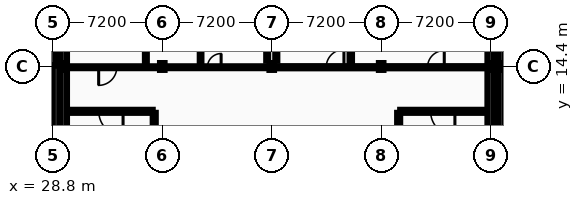
"""IFC4 building model, lengths in metres.
Left out: names, types, materials, properties, quantities, classifications, styles, units other than length and angle.
Written with IfcOpenShell. Run it as: python <this file> out.ifc"""

import sys

from ifc_helpers import new_model, si_unit, direction, frame, frame_2d, origin, origin_2d, place, context, subcontext, project, spatial, rectangle, i_section, extrude, element, fill, save


model = new_model("IFC4")
c1 = context("Model", 3, precision=1e-05, world=origin(), true_north=direction((0.0, 1.0)))
c2 = subcontext(c1, "Body", "Model", "MODEL_VIEW")
j1 = project(units=[si_unit("LENGTHUNIT", "METRE"), si_unit("PLANEANGLEUNIT", "RADIAN")], contexts=[c1])
p1 = place(None, origin())
s1 = spatial("IfcSite", under=j1, at=p1, CompositionType="ELEMENT")
p2 = place(p1, origin())
s2 = spatial("IfcBuilding", under=s1, at=p2, CompositionType="ELEMENT")
p3 = place(p2, origin())
s3 = spatial("IfcBuildingStorey", under=s2, at=p3, CompositionType="ELEMENT", Elevation=0.0)
for number, where, z_axis, x_axis in (
    (1, (29.52, 14.4, 0.0), (0.0, 0.0, 1.0), (1.0, 0.0, 0.0)),
    (2, (36.0, 14.4, 0.0), (0.0, 0.0, 1.0), (1.0, 0.0, 0.0)),
    (3, (43.2, 14.4, 0.0), (0.0, 0.0, 1.0), (1.0, 0.0, 0.0)),
    (4, (50.4, 14.4, 0.0), (0.0, 0.0, 1.0), (1.0, 0.0, 0.0)),
    (5, (57.6, 14.4, 0.0), (0.0, 0.0, 1.0), (1.0, 0.0, 0.0)),
    (6, (58.32, 14.4, 0.0), (0.0, 0.0, 1.0), (1.0, 0.0, 0.0)),
):
    element("IfcColumn", number, at=place(p3, frame(where, z_axis=z_axis, x_axis=x_axis)), inside=s3, PredefinedType="COLUMN", context=c2, shape_type="SweptSolid", body=[
        extrude(i_section(OverallWidth=0.3, OverallDepth=0.45, WebThickness=0.014, FlangeThickness=0.026, FilletRadius=0.027, at=origin_2d()), origin(), (0.0, 0.0, 1.0), 5.2),
    ])
p4 = place(p3, frame((28.8, 14.45, 0.0), z_axis=(0.0, 0.0, 1.0), x_axis=(0.0, 1.0, 0.0)))
e7 = element("IfcWall", 7, at=p4, inside=s3, PredefinedType="STANDARD", context=c2, shape_type="SweptSolid", body=[
    extrude(rectangle(XDim=7.15, YDim=0.42, at=frame_2d((3.575, 0.0))), origin(), (0.0, 0.0, 1.0), 4.97),
])
p5 = place(p4, frame((1.647, 0.0, 0.95)))
e8 = element("IfcOpeningElement", 8, at=p5, cuts=e7, PredefinedType="OPENING", context=c2, shape_type="SweptSolid", body=[
    extrude(rectangle(XDim=0.996, YDim=1.26, at=frame_2d((0.498, 0.63))), frame((0.0, 0.22, 0.0), z_axis=(0.0, -1.0, 0.0), x_axis=(1.0, 0.0, 0.0)), (0.0, 0.0, 1.0), 0.44),
])
p6 = place(p4, frame((4.507, 0.0, 0.95)))
e9 = element("IfcOpeningElement", 9, at=p6, cuts=e7, PredefinedType="OPENING", context=c2, shape_type="SweptSolid", body=[
    extrude(rectangle(XDim=0.996, YDim=1.26, at=frame_2d((0.498, 0.63))), frame((0.0, 0.22, 0.0), z_axis=(0.0, -1.0, 0.0), x_axis=(1.0, 0.0, 0.0)), (0.0, 0.0, 1.0), 0.44),
])
p7 = place(p3, frame((29.52, 14.4, 0.0), z_axis=(0.0, 0.0, 1.0), x_axis=(0.0, -1.0, 0.0)))
e10 = element("IfcWall", 10, at=p7, inside=s3, PredefinedType="STANDARD", context=c2, shape_type="SweptSolid", body=[
    extrude(rectangle(XDim=5.5, YDim=0.42, at=frame_2d((2.75, 0.0))), origin(), (0.0, 0.0, 1.0), 4.97),
])
p8 = place(p3, frame((29.52, 21.6, 0.0), z_axis=(0.0, 0.0, 1.0), x_axis=(0.0, -1.0, 0.0)))
e11 = element("IfcWall", 11, at=p8, inside=s3, PredefinedType="STANDARD", context=c2, shape_type="SweptSolid", body=[
    extrude(rectangle(XDim=7.2, YDim=0.42, at=frame_2d((3.6, 0.0))), origin(), (0.0, 0.0, 1.0), 4.665),
])
p9 = place(p8, frame((1.628, 0.0, 0.95)))
e12 = element("IfcOpeningElement", 12, at=p9, cuts=e11, PredefinedType="OPENING", context=c2, shape_type="SweptSolid", body=[
    extrude(rectangle(XDim=1.064, YDim=1.296, at=frame_2d((0.532, 0.648))), frame((0.0, 0.22, 0.0), z_axis=(0.0, -1.0, 0.0), x_axis=(1.0, 0.0, 0.0)), (0.0, 0.0, 1.0), 0.44),
])
p10 = place(p8, frame((4.508, 0.0, 0.95)))
e13 = element("IfcOpeningElement", 13, at=p10, cuts=e11, PredefinedType="OPENING", context=c2, shape_type="SweptSolid", body=[
    extrude(rectangle(XDim=1.064, YDim=1.296, at=frame_2d((0.532, 0.648))), frame((0.0, 0.22, 0.0), z_axis=(0.0, -1.0, 0.0), x_axis=(1.0, 0.0, 0.0)), (0.0, 0.0, 1.0), 0.44),
])
p11 = place(p3, frame((57.6, 8.9, 0.0), z_axis=(0.0, 0.0, 1.0), x_axis=(0.0, 1.0, 0.0)))
e14 = element("IfcWall", 14, at=p11, inside=s3, PredefinedType="STANDARD", context=c2, shape_type="SweptSolid", body=[
    extrude(rectangle(XDim=5.5, YDim=0.42, at=frame_2d((2.75, 0.0))), origin(), (0.0, 0.0, 1.0), 4.97),
])
p12 = place(p3, frame((57.6, 14.4, 0.0), z_axis=(0.0, 0.0, 1.0), x_axis=(0.0, 1.0, 0.0)))
e15 = element("IfcWall", 15, at=p12, inside=s3, PredefinedType="STANDARD", context=c2, shape_type="SweptSolid", body=[
    extrude(rectangle(XDim=7.2, YDim=0.42, at=frame_2d((3.6, 0.0))), origin(), (0.0, 0.0, 1.0), 4.665),
])
p13 = place(p12, frame((1.56, 0.0, 0.95)))
e16 = element("IfcOpeningElement", 16, at=p13, cuts=e15, PredefinedType="OPENING", context=c2, shape_type="SweptSolid", body=[
    extrude(rectangle(XDim=1.2, YDim=1.296, at=frame_2d((0.6, 0.648))), frame((0.0, 0.22, 0.0), z_axis=(0.0, -1.0, 0.0), x_axis=(1.0, 0.0, 0.0)), (0.0, 0.0, 1.0), 0.44),
])
p14 = place(p12, frame((4.44, 0.0, 0.95)))
e17 = element("IfcOpeningElement", 17, at=p14, cuts=e15, PredefinedType="OPENING", context=c2, shape_type="SweptSolid", body=[
    extrude(rectangle(XDim=1.2, YDim=1.296, at=frame_2d((0.6, 0.648))), frame((0.0, 0.22, 0.0), z_axis=(0.0, -1.0, 0.0), x_axis=(1.0, 0.0, 0.0)), (0.0, 0.0, 1.0), 0.44),
])
p15 = place(p3, frame((58.32, 14.4, 0.0), z_axis=(0.0, 0.0, 1.0), x_axis=(0.0, -1.0, 0.0)))
e18 = element("IfcWall", 18, at=p15, inside=s3, PredefinedType="STANDARD", context=c2, shape_type="SweptSolid", body=[
    extrude(rectangle(XDim=5.5, YDim=0.42, at=frame_2d((2.75, 0.0))), origin(), (0.0, 0.0, 1.0), 4.97),
])
p16 = place(p3, frame((58.32, 21.6, 0.0), z_axis=(0.0, 0.0, 1.0), x_axis=(0.0, -1.0, 0.0)))
e19 = element("IfcWall", 19, at=p16, inside=s3, PredefinedType="STANDARD", context=c2, shape_type="SweptSolid", body=[
    extrude(rectangle(XDim=7.2, YDim=0.42, at=frame_2d((3.6, 0.0))), origin(), (0.0, 0.0, 1.0), 4.665),
])
p17 = place(p16, frame((1.713, 0.0, 0.95)))
e20 = element("IfcOpeningElement", 20, at=p17, cuts=e19, PredefinedType="OPENING", context=c2, shape_type="SweptSolid", body=[
    extrude(rectangle(XDim=0.894, YDim=1.26, at=frame_2d((0.447, 0.63))), frame((0.0, 0.22, 0.0), z_axis=(0.0, -1.0, 0.0), x_axis=(1.0, 0.0, 0.0)), (0.0, 0.0, 1.0), 0.44),
])
p18 = place(p16, frame((4.593, 0.0, 0.95)))
e21 = element("IfcOpeningElement", 21, at=p18, cuts=e19, PredefinedType="OPENING", context=c2, shape_type="SweptSolid", body=[
    extrude(rectangle(XDim=0.894, YDim=1.26, at=frame_2d((0.447, 0.63))), frame((0.0, 0.22, 0.0), z_axis=(0.0, -1.0, 0.0), x_axis=(1.0, 0.0, 0.0)), (0.0, 0.0, 1.0), 0.44),
])
p19 = place(p3, frame((28.6, 5.85, 0.0), z_axis=(0.0, 0.0, 1.0), x_axis=(0.0, 1.0, 0.0)))
e22 = element("IfcWall", 22, at=p19, inside=s3, PredefinedType="SHEAR", context=c2, shape_type="SweptSolid", body=[
    extrude(rectangle(XDim=8.6, YDim=0.4, at=frame_2d((4.3, 0.0))), origin(), (0.0, 0.0, 1.0), 4.97),
])
p20 = place(p19, frame((6.65, 0.0, 0.0)))
e23 = element("IfcOpeningElement", 23, at=p20, cuts=e22, PredefinedType="OPENING", context=c2, shape_type="SweptSolid", body=[
    extrude(rectangle(XDim=1.2, YDim=2.15, at=frame_2d((0.6, 1.075))), frame((0.0, 0.21, 0.0), z_axis=(0.0, -1.0, 0.0), x_axis=(1.0, 0.0, 0.0)), (0.0, 0.0, 1.0), 0.42),
])
p21 = place(p3, frame((29.87, 11.45, 0.0), z_axis=(0.0, 0.0, 1.0), x_axis=(1.0, 0.0, 0.0)))
e24 = element("IfcWall", 24, at=p21, inside=s3, PredefinedType="PARTITIONING", context=c2, shape_type="SweptSolid", body=[
    extrude(rectangle(XDim=5.5, YDim=0.2, at=frame_2d((2.75, 0.0))), origin(), (0.0, 0.0, 1.0), 4.97),
])
p22 = place(p21, frame((1.95, 0.0, 0.0)))
e25 = element("IfcOpeningElement", 25, at=p22, cuts=e24, PredefinedType="OPENING", context=c2, shape_type="SweptSolid", body=[
    extrude(rectangle(XDim=1.6, YDim=2.2, at=frame_2d((0.8, 1.1))), frame((0.0, 0.11, 0.0), z_axis=(0.0, -1.0, 0.0), x_axis=(1.0, 0.0, 0.0)), (0.0, 0.0, 1.0), 0.22),
])
p23 = place(p3, frame((35.47, 8.9, 0.0), z_axis=(0.0, 0.0, 1.0), x_axis=(0.0, 1.0, 0.0)))
e26 = element("IfcWall", 26, at=p23, inside=s3, PredefinedType="PARTITIONING", context=c2, shape_type="SweptSolid", body=[
    extrude(rectangle(XDim=2.45, YDim=0.2, at=frame_2d((1.225, 0.0))), origin(), (0.0, 0.0, 1.0), 4.97),
])
p24 = place(p3, frame((51.65, 11.45, 0.0), z_axis=(0.0, 0.0, 1.0), x_axis=(1.0, 0.0, 0.0)))
e27 = element("IfcWall", 27, at=p24, inside=s3, PredefinedType="PARTITIONING", context=c2, shape_type="SweptSolid", body=[
    extrude(rectangle(XDim=5.6, YDim=0.2, at=frame_2d((2.8, 0.0))), origin(), (0.0, 0.0, 1.0), 4.97),
])
p25 = place(p24, frame((2.0, 0.0, 0.0)))
e28 = element("IfcOpeningElement", 28, at=p25, cuts=e27, PredefinedType="OPENING", context=c2, shape_type="SweptSolid", body=[
    extrude(rectangle(XDim=1.6, YDim=2.2, at=frame_2d((0.8, 1.1))), frame((0.0, 0.11, 0.0), z_axis=(0.0, -1.0, 0.0), x_axis=(1.0, 0.0, 0.0)), (0.0, 0.0, 1.0), 0.22),
])
p26 = place(p3, frame((51.55, 8.9, 0.0), z_axis=(0.0, 0.0, 1.0), x_axis=(0.0, 1.0, 0.0)))
e29 = element("IfcWall", 29, at=p26, inside=s3, PredefinedType="PARTITIONING", context=c2, shape_type="SweptSolid", body=[
    extrude(rectangle(XDim=2.45, YDim=0.2, at=frame_2d((1.225, 0.0))), origin(), (0.0, 0.0, 1.0), 4.97),
])
p27 = place(p3, frame((29.9, 14.35, 0.0), z_axis=(0.0, 0.0, 1.0), x_axis=(1.0, 0.0, 0.0)))
e30 = element("IfcWall", 30, at=p27, inside=s3, PredefinedType="PARTITIONING", context=c2, shape_type="SweptSolid", body=[
    extrude(rectangle(XDim=5.72, YDim=0.125, at=frame_2d((2.86, 0.0))), origin(), (0.0, 0.0, 1.0), 4.665),
])
p28 = place(p27, frame((1.914, 0.0, 0.0)))
e31 = element("IfcOpeningElement", 31, at=p28, cuts=e30, PredefinedType="OPENING", context=c2, shape_type="SweptSolid", body=[
    extrude(rectangle(XDim=1.192, YDim=2.068, at=frame_2d((0.596, 1.034))), frame((0.0, 0.073, 0.0), z_axis=(0.0, -1.0, 0.0), x_axis=(1.0, 0.0, 0.0)), (0.0, 0.0, 1.0), 0.145),
])
p29 = place(p3, frame((36.38, 14.35, 0.0), z_axis=(0.0, 0.0, 1.0), x_axis=(1.0, 0.0, 0.0)))
e32 = element("IfcWall", 32, at=p29, inside=s3, PredefinedType="PARTITIONING", context=c2, shape_type="SweptSolid", body=[
    extrude(rectangle(XDim=6.44, YDim=0.125, at=frame_2d((3.22, 0.0))), origin(), (0.0, 0.0, 1.0), 4.665),
])
p30 = place(p29, frame((0.57, 0.0, 0.0)))
e33 = element("IfcOpeningElement", 33, at=p30, cuts=e32, PredefinedType="OPENING", context=c2, shape_type="SweptSolid", body=[
    extrude(rectangle(XDim=1.0, YDim=2.1, at=frame_2d((0.5, 1.05))), frame((0.0, 0.073, 0.0), z_axis=(0.0, -1.0, 0.0), x_axis=(1.0, 0.0, 0.0)), (0.0, 0.0, 1.0), 0.145),
])
p31 = place(p29, frame((2.59, 0.0, 0.0)))
e34 = element("IfcOpeningElement", 34, at=p31, cuts=e32, PredefinedType="OPENING", context=c2, shape_type="SweptSolid", body=[
    extrude(rectangle(XDim=0.9, YDim=2.1, at=frame_2d((0.45, 1.05))), frame((0.0, 0.073, 0.0), z_axis=(0.0, -1.0, 0.0), x_axis=(1.0, 0.0, 0.0)), (0.0, 0.0, 1.0), 0.145),
])
p32 = place(p3, frame((43.58, 14.35, 0.0), z_axis=(0.0, 0.0, 1.0), x_axis=(1.0, 0.0, 0.0)))
e35 = element("IfcWall", 35, at=p32, inside=s3, PredefinedType="PARTITIONING", context=c2, shape_type="SweptSolid", body=[
    extrude(rectangle(XDim=6.44, YDim=0.142, at=frame_2d((3.22, 0.0))), origin(), (0.0, 0.0, 1.0), 4.665),
])
p33 = place(p32, frame((3.204, 0.0, 0.0)))
e36 = element("IfcOpeningElement", 36, at=p33, cuts=e35, PredefinedType="OPENING", context=c2, shape_type="SweptSolid", body=[
    extrude(rectangle(XDim=1.166, YDim=2.068, at=frame_2d((0.583, 1.034))), frame((0.0, 0.081, 0.0), z_axis=(0.0, -1.0, 0.0), x_axis=(1.0, 0.0, 0.0)), (0.0, 0.0, 1.0), 0.162),
])
p34 = place(p3, frame((50.78, 14.35, 0.0), z_axis=(0.0, 0.0, 1.0), x_axis=(1.0, 0.0, 0.0)))
e37 = element("IfcWall", 37, at=p34, inside=s3, PredefinedType="PARTITIONING", context=c2, shape_type="SweptSolid", body=[
    extrude(rectangle(XDim=6.44, YDim=0.142, at=frame_2d((3.22, 0.0))), origin(), (0.0, 0.0, 1.0), 4.665),
])
p35 = place(p34, frame((2.67, 0.0, 0.0)))
e38 = element("IfcOpeningElement", 38, at=p35, cuts=e37, PredefinedType="OPENING", context=c2, shape_type="SweptSolid", body=[
    extrude(rectangle(XDim=1.1, YDim=2.15, at=frame_2d((0.55, 1.075))), frame((0.0, 0.081, 0.0), z_axis=(0.0, -1.0, 0.0), x_axis=(1.0, 0.0, 0.0)), (0.0, 0.0, 1.0), 0.162),
])
p36 = place(p3, frame((34.92, 14.413, 0.0), z_axis=(0.0, 0.0, 1.0), x_axis=(0.0, 1.0, 0.0)))
e39 = element("IfcWall", 39, at=p36, inside=s3, PredefinedType="PARTITIONING", context=c2, shape_type="SweptSolid", body=[
    extrude(rectangle(XDim=14.188, YDim=0.125, at=frame_2d((7.094, 0.0))), origin(), (0.0, 0.0, 1.0), 4.97),
])
p37 = place(p3, frame((38.52, 14.413, 0.0), z_axis=(0.0, 0.0, 1.0), x_axis=(0.0, 1.0, 0.0)))
e40 = element("IfcWall", 40, at=p37, inside=s3, PredefinedType="PARTITIONING", context=c2, shape_type="SweptSolid", body=[
    extrude(rectangle(XDim=14.132, YDim=0.11, at=frame_2d((7.066, 0.0))), origin(), (0.0, 0.0, 1.0), 4.655),
])
p38 = place(p3, frame((42.9, 14.78, 0.0), z_axis=(0.0, 0.0, 1.0), x_axis=(0.0, 1.0, 0.0)))
e41 = element("IfcWall", 41, at=p38, inside=s3, PredefinedType="PARTITIONING", context=c2, shape_type="SweptSolid", body=[
    extrude(rectangle(XDim=6.44, YDim=0.125, at=frame_2d((3.22, 0.0))), origin(), (0.0, 0.0, 1.0), 4.97),
])
p39 = place(p3, frame((43.5, 14.78, 0.0), z_axis=(0.0, 0.0, 1.0), x_axis=(0.0, 1.0, 0.0)))
e42 = element("IfcWall", 42, at=p39, inside=s3, PredefinedType="PARTITIONING", context=c2, shape_type="SweptSolid", body=[
    extrude(rectangle(XDim=6.44, YDim=0.135, at=frame_2d((3.22, 0.0))), origin(), (0.0, 0.0, 1.0), 4.97),
])
p40 = place(p3, frame((48.4, 14.421, 0.0), z_axis=(0.0, 0.0, 1.0), x_axis=(0.0, 1.0, 0.0)))
e43 = element("IfcWall", 43, at=p40, inside=s3, PredefinedType="PARTITIONING", context=c2, shape_type="SweptSolid", body=[
    extrude(rectangle(XDim=14.112, YDim=0.16, at=frame_2d((7.056, 0.0))), origin(), (0.0, 0.0, 1.0), 4.97),
])
p41 = place(p22, origin())
e44 = element("IfcDoor", 44, at=p41, inside=s3, OperationType="DOUBLE_DOOR_SINGLE_SWING", PredefinedType="DOOR", context=c2, shape_type="SweptSolid", body=[
    extrude(rectangle(XDim=1.6, YDim=2.2, at=frame_2d((0.8, 1.1))), frame((0.0, 0.025, 0.0), z_axis=(0.0, -1.0, 0.0), x_axis=(1.0, 0.0, 0.0)), (0.0, 0.0, 1.0), 0.05),
])
fill(e25, e44)
p42 = place(p25, origin())
e45 = element("IfcDoor", 45, at=p42, inside=s3, OperationType="DOUBLE_DOOR_SINGLE_SWING", PredefinedType="DOOR", context=c2, shape_type="SweptSolid", body=[
    extrude(rectangle(XDim=1.6, YDim=2.2, at=frame_2d((0.8, 1.1))), frame((0.0, 0.025, 0.0), z_axis=(0.0, -1.0, 0.0), x_axis=(1.0, 0.0, 0.0)), (0.0, 0.0, 1.0), 0.05),
])
fill(e28, e45)
p43 = place(p30, frame((1.0, 0.0, 0.0), z_axis=(0.0, 0.0, 1.0), x_axis=(-1.0, 0.0, 0.0)))
e46 = element("IfcDoor", 46, at=p43, inside=s3, OperationType="SLIDING_TO_LEFT", PredefinedType="DOOR", context=c2, shape_type="SweptSolid", body=[
    extrude(rectangle(XDim=1.0, YDim=2.1, at=frame_2d((0.5, 1.05))), frame((0.0, 0.025, 0.0), z_axis=(0.0, -1.0, 0.0), x_axis=(1.0, 0.0, 0.0)), (0.0, 0.0, 1.0), 0.05),
])
fill(e33, e46)
p44 = place(p31, frame((0.9, 0.0, 0.0), z_axis=(0.0, 0.0, 1.0), x_axis=(-1.0, 0.0, 0.0)))
e47 = element("IfcDoor", 47, at=p44, inside=s3, OperationType="SINGLE_SWING_RIGHT", PredefinedType="DOOR", context=c2, shape_type="SweptSolid", body=[
    extrude(rectangle(XDim=0.9, YDim=2.1, at=frame_2d((0.45, 1.05))), frame((0.0, 0.025, 0.0), z_axis=(0.0, -1.0, 0.0), x_axis=(1.0, 0.0, 0.0)), (0.0, 0.0, 1.0), 0.05),
])
fill(e34, e47)
p45 = place(p33, frame((1.166, 0.0, 0.0), z_axis=(0.0, 0.0, 1.0), x_axis=(-1.0, 0.0, 0.0)))
e48 = element("IfcDoor", 48, at=p45, inside=s3, OperationType="SINGLE_SWING_RIGHT", PredefinedType="DOOR", context=c2, shape_type="SweptSolid", body=[
    extrude(rectangle(XDim=1.166, YDim=2.068, at=frame_2d((0.583, 1.034))), frame((0.0, 0.025, 0.0), z_axis=(0.0, -1.0, 0.0), x_axis=(1.0, 0.0, 0.0)), (0.0, 0.0, 1.0), 0.05),
])
fill(e36, e48)
p46 = place(p28, frame((1.192, 0.0, 0.0), z_axis=(0.0, 0.0, 1.0), x_axis=(-1.0, 0.0, 0.0)))
e49 = element("IfcDoor", 49, at=p46, inside=s3, OperationType="SINGLE_SWING_LEFT", PredefinedType="DOOR", context=c2, shape_type="SweptSolid", body=[
    extrude(rectangle(XDim=1.192, YDim=2.068, at=frame_2d((0.596, 1.034))), frame((0.0, 0.025, 0.0), z_axis=(0.0, -1.0, 0.0), x_axis=(1.0, 0.0, 0.0)), (0.0, 0.0, 1.0), 0.05),
])
fill(e31, e49)
p47 = place(p35, frame((1.1, 0.0, 0.0), z_axis=(0.0, 0.0, 1.0), x_axis=(-1.0, 0.0, 0.0)))
e50 = element("IfcDoor", 50, at=p47, inside=s3, OperationType="SINGLE_SWING_RIGHT", PredefinedType="DOOR", context=c2, shape_type="SweptSolid", body=[
    extrude(rectangle(XDim=1.1, YDim=2.15, at=frame_2d((0.55, 1.075))), frame((0.0, 0.025, 0.0), z_axis=(0.0, -1.0, 0.0), x_axis=(1.0, 0.0, 0.0)), (0.0, 0.0, 1.0), 0.05),
])
fill(e38, e50)
save(model, sys.argv[1])
